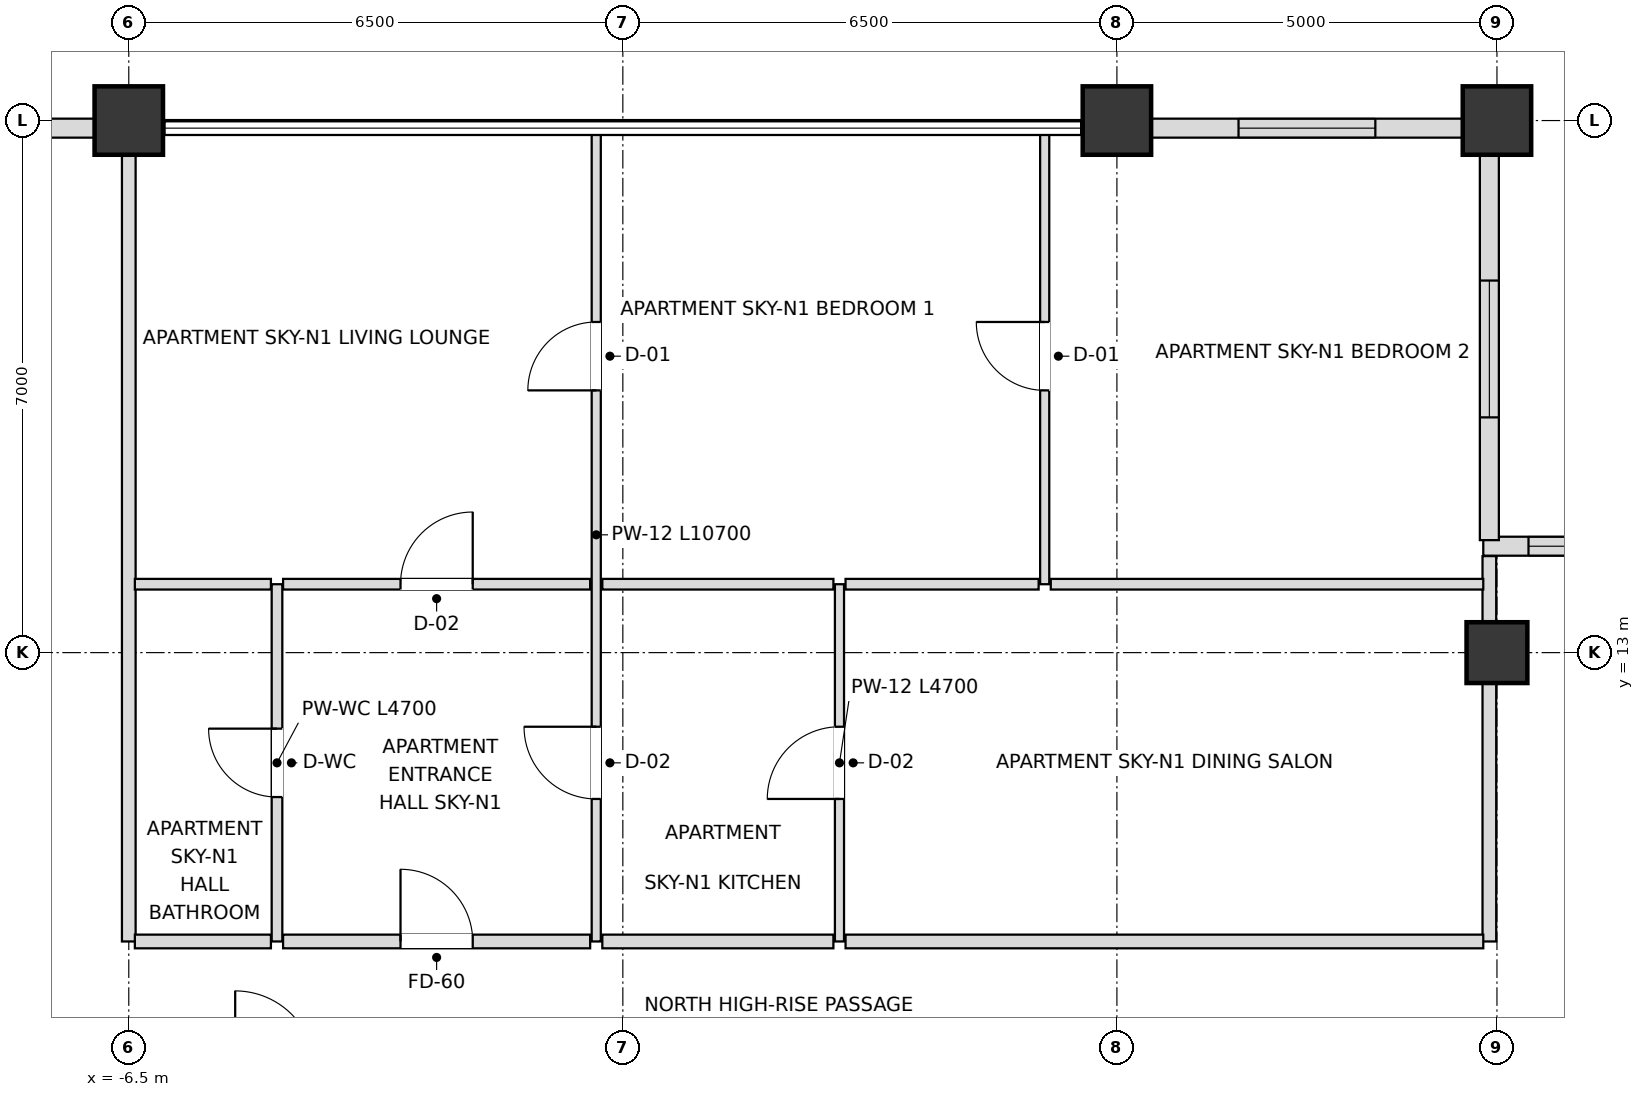
"""IFC4 building model, lengths in metres.
Left out: names, types, materials, properties, quantities, classifications, styles, units other than length and angle.
Written with IfcOpenShell. Run it as: python <this file> out.ifc"""

import sys

from ifc_helpers import new_model, si_unit, direction, frame, frame_2d, origin, origin_2d, place, context, subcontext, project, spatial, rectangle, extrude, element, fill, save


model = new_model("IFC4")
c1 = context("Model", 3, precision=1e-05, world=origin(), true_north=direction((0.0, 1.0)))
c2 = subcontext(c1, "Body", "Model", "MODEL_VIEW")
j1 = project(units=[si_unit("LENGTHUNIT", "METRE"), si_unit("PLANEANGLEUNIT", "RADIAN")], contexts=[c1])
p1 = place(None, origin())
s1 = spatial("IfcSite", under=j1, at=p1, CompositionType="ELEMENT")
p2 = place(p1, origin())
s2 = spatial("IfcBuilding", under=s1, at=p2, CompositionType="ELEMENT")
p3 = place(p2, frame((0.0, 0.0, 222.3)))
s3 = spatial("IfcBuildingStorey", under=s2, at=p3, CompositionType="ELEMENT", Elevation=222.3)
for number, where, z_axis, x_axis in (
    (1, (11.5, 20.0, 0.0), (0.0, 0.0, 1.0), (1.0, 0.0, 0.0)),
    (2, (6.5, 20.0, 0.0), (0.0, 0.0, 1.0), (1.0, 0.0, 0.0)),
    (3, (-6.5, 20.0, 0.0), (0.0, 0.0, 1.0), (1.0, 0.0, 0.0)),
):
    element("IfcColumn", number, at=place(p3, frame(where, z_axis=z_axis, x_axis=x_axis)), inside=s3, PredefinedType="USERDEFINED", context=c2, shape_type="SweptSolid", body=[
        extrude(rectangle(XDim=0.9, YDim=0.9, at=origin_2d()), origin(), (0.0, 0.0, 1.0), 3.6),
    ])
p4 = place(p3, frame((11.5, 13.0, 0.0), z_axis=(0.0, 0.0, 1.0), x_axis=(1.0, 0.0, 0.0)))
e4 = element("IfcColumn", 4, at=p4, inside=s3, PredefinedType="COLUMN", context=c2, shape_type="SweptSolid", body=[
    extrude(rectangle(XDim=0.8, YDim=0.8, at=origin_2d()), origin(), (0.0, 0.0, 1.0), 3.6),
])
p5 = place(p3, frame((11.055, 19.9, 0.0), z_axis=(0.0, 0.0, 1.0), x_axis=(-1.0, 0.0, 0.0)))
e5 = element("IfcWall", 5, at=p5, inside=s3, PredefinedType="SOLIDWALL", context=c2, shape_type="SweptSolid", body=[
    extrude(rectangle(XDim=4.11, YDim=0.25, at=frame_2d((2.055, 0.0))), origin(), (0.0, 0.0, 1.0), 2.748),
])
p6 = place(p5, frame((1.155, 0.0, 0.72)))
e6 = element("IfcOpeningElement", 6, at=p6, cuts=e5, PredefinedType="OPENING", context=c2, shape_type="SweptSolid", body=[
    extrude(rectangle(XDim=1.8, YDim=1.68, at=frame_2d((0.9, 0.84))), frame((0.0, 0.135, 0.0), z_axis=(0.0, -1.0, 0.0), x_axis=(1.0, 0.0, 0.0)), (0.0, 0.0, 1.0), 0.27),
])
p7 = place(p3, frame((-6.945, 19.9, 0.0), z_axis=(0.0, 0.0, 1.0), x_axis=(-1.0, 0.0, 0.0)))
e7 = element("IfcWall", 7, at=p7, inside=s3, PredefinedType="SOLIDWALL", context=c2, shape_type="SweptSolid", body=[
    extrude(rectangle(XDim=4.11, YDim=0.25, at=frame_2d((2.055, 0.0))), origin(), (0.0, 0.0, 1.0), 2.748),
])
p8 = place(p7, frame((1.155, 0.0, 0.72)))
e8 = element("IfcOpeningElement", 8, at=p8, cuts=e7, PredefinedType="OPENING", context=c2, shape_type="SweptSolid", body=[
    extrude(rectangle(XDim=1.8, YDim=1.68, at=frame_2d((0.9, 0.84))), frame((0.0, 0.135, 0.0), z_axis=(0.0, -1.0, 0.0), x_axis=(1.0, 0.0, 0.0)), (0.0, 0.0, 1.0), 0.27),
])
p9 = place(p3, frame((16.98, 14.4, 0.0), z_axis=(0.0, 0.0, 1.0), x_axis=(-1.0, 0.0, 0.0)))
e9 = element("IfcWall", 9, at=p9, inside=s3, PredefinedType="SOLIDWALL", context=c2, shape_type="SweptSolid", body=[
    extrude(rectangle(XDim=5.66, YDim=0.25, at=frame_2d((2.83, 0.0))), origin(), (0.0, 0.0, 1.0), 2.748),
])
p10 = place(p9, frame((0.595, 0.0, 0.72)))
e10 = element("IfcOpeningElement", 10, at=p10, cuts=e9, PredefinedType="OPENING", context=c2, shape_type="SweptSolid", body=[
    extrude(rectangle(XDim=1.8, YDim=1.68, at=frame_2d((0.9, 0.84))), frame((0.0, 0.135, 0.0), z_axis=(0.0, -1.0, 0.0), x_axis=(1.0, 0.0, 0.0)), (0.0, 0.0, 1.0), 0.27),
])
p11 = place(p9, frame((3.265, 0.0, 0.72)))
e11 = element("IfcOpeningElement", 11, at=p11, cuts=e9, PredefinedType="OPENING", context=c2, shape_type="SweptSolid", body=[
    extrude(rectangle(XDim=1.8, YDim=1.68, at=frame_2d((0.9, 0.84))), frame((0.0, 0.135, 0.0), z_axis=(0.0, -1.0, 0.0), x_axis=(1.0, 0.0, 0.0)), (0.0, 0.0, 1.0), 0.27),
])
p12 = place(p3, frame((11.4, 14.48, 0.0), z_axis=(0.0, 0.0, 1.0), x_axis=(0.0, 1.0, 0.0)))
e12 = element("IfcWall", 12, at=p12, inside=s3, PredefinedType="SOLIDWALL", context=c2, shape_type="SweptSolid", body=[
    extrude(rectangle(XDim=5.34, YDim=0.25, at=frame_2d((2.67, 0.0))), origin(), (0.0, 0.0, 1.0), 2.748),
])
p13 = place(p12, frame((1.615, 0.0, 0.72)))
e13 = element("IfcOpeningElement", 13, at=p13, cuts=e12, PredefinedType="OPENING", context=c2, shape_type="SweptSolid", body=[
    extrude(rectangle(XDim=1.8, YDim=1.68, at=frame_2d((0.9, 0.84))), frame((0.0, 0.135, 0.0), z_axis=(0.0, -1.0, 0.0), x_axis=(1.0, 0.0, 0.0)), (0.0, 0.0, 1.0), 0.27),
])
p14 = place(p3, frame((-6.5, 9.2, 0.0), z_axis=(0.0, 0.0, 1.0), x_axis=(0.0, 1.0, 0.0)))
e14 = element("IfcWall", 14, at=p14, inside=s3, PredefinedType="PARTITIONING", context=c2, shape_type="SweptSolid", body=[
    extrude(rectangle(XDim=10.7, YDim=0.18, at=frame_2d((5.35, 0.0))), origin(), (0.0, 0.0, 1.0), 2.826),
])
p15 = place(p3, frame((-4.55, 9.2, 0.0), z_axis=(0.0, 0.0, 1.0), x_axis=(0.0, 1.0, 0.0)))
e15 = element("IfcWall", 15, at=p15, inside=s3, PredefinedType="PARTITIONING", context=c2, shape_type="SweptSolid", body=[
    extrude(rectangle(XDim=4.7, YDim=0.14, at=frame_2d((2.35, 0.0))), origin(), (0.0, 0.0, 1.0), 3.38),
])
p16 = place(p15, frame((1.9, 0.0, 0.0)))
e16 = element("IfcOpeningElement", 16, at=p16, cuts=e15, PredefinedType="OPENING", context=c2, shape_type="SweptSolid", body=[
    extrude(rectangle(XDim=0.9, YDim=2.1, at=frame_2d((0.45, 1.05))), frame((0.0, 0.08, 0.0), z_axis=(0.0, -1.0, 0.0), x_axis=(1.0, 0.0, 0.0)), (0.0, 0.0, 1.0), 0.16),
])
p17 = place(p3, frame((-0.35, 9.2, 0.0), z_axis=(0.0, 0.0, 1.0), x_axis=(0.0, 1.0, 0.0)))
e17 = element("IfcWall", 17, at=p17, inside=s3, PredefinedType="PARTITIONING", context=c2, shape_type="SweptSolid", body=[
    extrude(rectangle(XDim=10.7, YDim=0.12, at=frame_2d((5.35, 0.0))), origin(), (0.0, 0.0, 1.0), 3.018),
])
p18 = place(p17, frame((1.875, 0.0, 0.0)))
e18 = element("IfcOpeningElement", 18, at=p18, cuts=e17, PredefinedType="OPENING", context=c2, shape_type="SweptSolid", body=[
    extrude(rectangle(XDim=0.95, YDim=2.1, at=frame_2d((0.475, 1.05))), frame((0.0, 0.07, 0.0), z_axis=(0.0, -1.0, 0.0), x_axis=(1.0, 0.0, 0.0)), (0.0, 0.0, 1.0), 0.14),
])
p19 = place(p17, frame((7.25, 0.0, 0.0)))
e19 = element("IfcOpeningElement", 19, at=p19, cuts=e17, PredefinedType="OPENING", context=c2, shape_type="SweptSolid", body=[
    extrude(rectangle(XDim=0.9, YDim=2.1, at=frame_2d((0.45, 1.05))), frame((0.0, 0.07, 0.0), z_axis=(0.0, -1.0, 0.0), x_axis=(1.0, 0.0, 0.0)), (0.0, 0.0, 1.0), 0.14),
])
p20 = place(p3, frame((2.85, 9.2, 0.0), z_axis=(0.0, 0.0, 1.0), x_axis=(0.0, 1.0, 0.0)))
e20 = element("IfcWall", 20, at=p20, inside=s3, PredefinedType="PARTITIONING", context=c2, shape_type="SweptSolid", body=[
    extrude(rectangle(XDim=4.7, YDim=0.12, at=frame_2d((2.35, 0.0))), origin(), (0.0, 0.0, 1.0), 3.38),
])
p21 = place(p20, frame((1.875, 0.0, 0.0)))
e21 = element("IfcOpeningElement", 21, at=p21, cuts=e20, PredefinedType="OPENING", context=c2, shape_type="SweptSolid", body=[
    extrude(rectangle(XDim=0.95, YDim=2.1, at=frame_2d((0.475, 1.05))), frame((0.0, 0.07, 0.0), z_axis=(0.0, -1.0, 0.0), x_axis=(1.0, 0.0, 0.0)), (0.0, 0.0, 1.0), 0.14),
])
p22 = place(p3, frame((5.55, 13.9, 0.0), z_axis=(0.0, 0.0, 1.0), x_axis=(0.0, 1.0, 0.0)))
e22 = element("IfcWall", 22, at=p22, inside=s3, PredefinedType="PARTITIONING", context=c2, shape_type="SweptSolid", body=[
    extrude(rectangle(XDim=6.0, YDim=0.12, at=frame_2d((3.0, 0.0))), origin(), (0.0, 0.0, 1.0), 3.018),
])
p23 = place(p22, frame((2.55, 0.0, 0.0)))
e23 = element("IfcOpeningElement", 23, at=p23, cuts=e22, PredefinedType="OPENING", context=c2, shape_type="SweptSolid", body=[
    extrude(rectangle(XDim=0.9, YDim=2.1, at=frame_2d((0.45, 1.05))), frame((0.0, 0.07, 0.0), z_axis=(0.0, -1.0, 0.0), x_axis=(1.0, 0.0, 0.0)), (0.0, 0.0, 1.0), 0.14),
])
p24 = place(p3, frame((11.4, 9.2, 0.0), z_axis=(0.0, 0.0, 1.0), x_axis=(0.0, 1.0, 0.0)))
e24 = element("IfcWall", 24, at=p24, inside=s3, PredefinedType="PARTITIONING", context=c2, shape_type="SweptSolid", body=[
    extrude(rectangle(XDim=5.07, YDim=0.18, at=frame_2d((2.535, 0.0))), origin(), (0.0, 0.0, 1.0), 2.748),
])
p25 = place(p3, frame((-6.42, 9.2, 0.0), z_axis=(0.0, 0.0, 1.0), x_axis=(1.0, 0.0, 0.0)))
e25 = element("IfcWall", 25, at=p25, inside=s3, PredefinedType="PARTITIONING", context=c2, shape_type="SweptSolid", body=[
    extrude(rectangle(XDim=1.79, YDim=0.18, at=frame_2d((0.895, 0.0))), origin(), (0.0, 0.0, 1.0), 3.38),
])
p26 = place(p3, frame((-4.47, 9.2, 0.0), z_axis=(0.0, 0.0, 1.0), x_axis=(1.0, 0.0, 0.0)))
e26 = element("IfcWall", 26, at=p26, inside=s3, PredefinedType="PARTITIONING", context=c2, shape_type="SweptSolid", body=[
    extrude(rectangle(XDim=4.04, YDim=0.18, at=frame_2d((2.02, 0.0))), origin(), (0.0, 0.0, 1.0), 3.38),
])
p27 = place(p26, frame((1.545, 0.0, 0.0)))
e27 = element("IfcOpeningElement", 27, at=p27, cuts=e26, PredefinedType="OPENING", context=c2, shape_type="SweptSolid", body=[
    extrude(rectangle(XDim=0.95, YDim=2.15, at=frame_2d((0.475, 1.075))), frame((0.0, 0.1, 0.0), z_axis=(0.0, -1.0, 0.0), x_axis=(1.0, 0.0, 0.0)), (0.0, 0.0, 1.0), 0.2),
])
p28 = place(p3, frame((-0.27, 9.2, 0.0), z_axis=(0.0, 0.0, 1.0), x_axis=(1.0, 0.0, 0.0)))
e28 = element("IfcWall", 28, at=p28, inside=s3, PredefinedType="PARTITIONING", context=c2, shape_type="SweptSolid", body=[
    extrude(rectangle(XDim=3.04, YDim=0.18, at=frame_2d((1.52, 0.0))), origin(), (0.0, 0.0, 1.0), 3.38),
])
p29 = place(p3, frame((2.93, 9.2, 0.0), z_axis=(0.0, 0.0, 1.0), x_axis=(1.0, 0.0, 0.0)))
e29 = element("IfcWall", 29, at=p29, inside=s3, PredefinedType="PARTITIONING", context=c2, shape_type="SweptSolid", body=[
    extrude(rectangle(XDim=8.39, YDim=0.18, at=frame_2d((4.195, 0.0))), origin(), (0.0, 0.0, 1.0), 2.826),
])
p30 = place(p3, frame((-6.42, 13.9, 0.0), z_axis=(0.0, 0.0, 1.0), x_axis=(1.0, 0.0, 0.0)))
e30 = element("IfcWall", 30, at=p30, inside=s3, PredefinedType="PARTITIONING", context=c2, shape_type="SweptSolid", body=[
    extrude(rectangle(XDim=1.79, YDim=0.14, at=frame_2d((0.895, 0.0))), origin(), (0.0, 0.0, 1.0), 3.38),
])
p31 = place(p3, frame((-4.47, 13.9, 0.0), z_axis=(0.0, 0.0, 1.0), x_axis=(1.0, 0.0, 0.0)))
e31 = element("IfcWall", 31, at=p31, inside=s3, PredefinedType="PARTITIONING", context=c2, shape_type="SweptSolid", body=[
    extrude(rectangle(XDim=4.04, YDim=0.14, at=frame_2d((2.02, 0.0))), origin(), (0.0, 0.0, 1.0), 3.38),
])
p32 = place(p31, frame((1.545, 0.0, 0.0)))
e32 = element("IfcOpeningElement", 32, at=p32, cuts=e31, PredefinedType="OPENING", context=c2, shape_type="SweptSolid", body=[
    extrude(rectangle(XDim=0.95, YDim=2.1, at=frame_2d((0.475, 1.05))), frame((0.0, 0.08, 0.0), z_axis=(0.0, -1.0, 0.0), x_axis=(1.0, 0.0, 0.0)), (0.0, 0.0, 1.0), 0.16),
])
p33 = place(p3, frame((-0.27, 13.9, 0.0), z_axis=(0.0, 0.0, 1.0), x_axis=(1.0, 0.0, 0.0)))
e33 = element("IfcWall", 33, at=p33, inside=s3, PredefinedType="PARTITIONING", context=c2, shape_type="SweptSolid", body=[
    extrude(rectangle(XDim=3.04, YDim=0.14, at=frame_2d((1.52, 0.0))), origin(), (0.0, 0.0, 1.0), 3.38),
])
p34 = place(p3, frame((2.93, 13.9, 0.0), z_axis=(0.0, 0.0, 1.0), x_axis=(1.0, 0.0, 0.0)))
e34 = element("IfcWall", 34, at=p34, inside=s3, PredefinedType="PARTITIONING", context=c2, shape_type="SweptSolid", body=[
    extrude(rectangle(XDim=2.54, YDim=0.14, at=frame_2d((1.27, 0.0))), origin(), (0.0, 0.0, 1.0), 3.38),
])
p35 = place(p3, frame((5.63, 13.9, 0.0), z_axis=(0.0, 0.0, 1.0), x_axis=(1.0, 0.0, 0.0)))
e35 = element("IfcWall", 35, at=p35, inside=s3, PredefinedType="PARTITIONING", context=c2, shape_type="SweptSolid", body=[
    extrude(rectangle(XDim=5.69, YDim=0.14, at=frame_2d((2.845, 0.0))), origin(), (0.0, 0.0, 1.0), 2.826),
])
p36 = place(p6, origin())
e36 = element("IfcWindow", 36, at=p36, inside=s3, PartitioningType="SINGLE_PANEL", PredefinedType="WINDOW", context=c2, shape_type="SweptSolid", body=[
    extrude(rectangle(XDim=1.8, YDim=1.68, at=frame_2d((0.9, 0.84))), frame((0.0, 0.03, 0.0), z_axis=(0.0, -1.0, 0.0), x_axis=(1.0, 0.0, 0.0)), (0.0, 0.0, 1.0), 0.06),
])
fill(e6, e36)
p37 = place(p11, origin())
e37 = element("IfcWindow", 37, at=p37, inside=s3, PartitioningType="SINGLE_PANEL", PredefinedType="WINDOW", context=c2, shape_type="SweptSolid", body=[
    extrude(rectangle(XDim=1.8, YDim=1.68, at=frame_2d((0.9, 0.84))), frame((0.0, 0.03, 0.0), z_axis=(0.0, -1.0, 0.0), x_axis=(1.0, 0.0, 0.0)), (0.0, 0.0, 1.0), 0.06),
])
fill(e11, e37)
p38 = place(p13, origin())
e38 = element("IfcWindow", 38, at=p38, inside=s3, PartitioningType="SINGLE_PANEL", PredefinedType="WINDOW", context=c2, shape_type="SweptSolid", body=[
    extrude(rectangle(XDim=1.8, YDim=1.68, at=frame_2d((0.9, 0.84))), frame((0.0, 0.03, 0.0), z_axis=(0.0, -1.0, 0.0), x_axis=(1.0, 0.0, 0.0)), (0.0, 0.0, 1.0), 0.06),
])
fill(e13, e38)
p39 = place(p16, origin())
e39 = element("IfcDoor", 39, at=p39, inside=s3, OperationType="SINGLE_SWING_RIGHT", PredefinedType="DOOR", context=c2, shape_type="SweptSolid", body=[
    extrude(rectangle(XDim=0.9, YDim=2.1, at=frame_2d((0.45, 1.05))), frame((0.0, 0.025, 0.0), z_axis=(0.0, -1.0, 0.0), x_axis=(1.0, 0.0, 0.0)), (0.0, 0.0, 1.0), 0.05),
])
fill(e16, e39)
p40 = place(p27, origin())
e40 = element("IfcDoor", 40, at=p40, inside=s3, OperationType="SINGLE_SWING_LEFT", PredefinedType="DOOR", context=c2, shape_type="SweptSolid", body=[
    extrude(rectangle(XDim=0.95, YDim=2.15, at=frame_2d((0.475, 1.075))), frame((0.0, 0.025, 0.0), z_axis=(0.0, -1.0, 0.0), x_axis=(1.0, 0.0, 0.0)), (0.0, 0.0, 1.0), 0.05),
])
fill(e27, e40)
p41 = place(p18, origin())
e41 = element("IfcDoor", 41, at=p41, inside=s3, OperationType="SINGLE_SWING_RIGHT", PredefinedType="DOOR", context=c2, shape_type="SweptSolid", body=[
    extrude(rectangle(XDim=0.95, YDim=2.1, at=frame_2d((0.475, 1.05))), frame((0.0, 0.025, 0.0), z_axis=(0.0, -1.0, 0.0), x_axis=(1.0, 0.0, 0.0)), (0.0, 0.0, 1.0), 0.05),
])
fill(e18, e41)
p42 = place(p21, origin())
e42 = element("IfcDoor", 42, at=p42, inside=s3, OperationType="SINGLE_SWING_LEFT", PredefinedType="DOOR", context=c2, shape_type="SweptSolid", body=[
    extrude(rectangle(XDim=0.95, YDim=2.1, at=frame_2d((0.475, 1.05))), frame((0.0, 0.025, 0.0), z_axis=(0.0, -1.0, 0.0), x_axis=(1.0, 0.0, 0.0)), (0.0, 0.0, 1.0), 0.05),
])
fill(e21, e42)
p43 = place(p32, origin())
e43 = element("IfcDoor", 43, at=p43, inside=s3, OperationType="SINGLE_SWING_RIGHT", PredefinedType="DOOR", context=c2, shape_type="SweptSolid", body=[
    extrude(rectangle(XDim=0.95, YDim=2.1, at=frame_2d((0.475, 1.05))), frame((0.0, 0.025, 0.0), z_axis=(0.0, -1.0, 0.0), x_axis=(1.0, 0.0, 0.0)), (0.0, 0.0, 1.0), 0.05),
])
fill(e32, e43)
p44 = place(p19, origin())
e44 = element("IfcDoor", 44, at=p44, inside=s3, OperationType="SINGLE_SWING_LEFT", PredefinedType="DOOR", context=c2, shape_type="SweptSolid", body=[
    extrude(rectangle(XDim=0.9, YDim=2.1, at=frame_2d((0.45, 1.05))), frame((0.0, 0.025, 0.0), z_axis=(0.0, -1.0, 0.0), x_axis=(1.0, 0.0, 0.0)), (0.0, 0.0, 1.0), 0.05),
])
fill(e19, e44)
p45 = place(p23, origin())
e45 = element("IfcDoor", 45, at=p45, inside=s3, OperationType="SINGLE_SWING_RIGHT", PredefinedType="DOOR", context=c2, shape_type="SweptSolid", body=[
    extrude(rectangle(XDim=0.9, YDim=2.1, at=frame_2d((0.45, 1.05))), frame((0.0, 0.025, 0.0), z_axis=(0.0, -1.0, 0.0), x_axis=(1.0, 0.0, 0.0)), (0.0, 0.0, 1.0), 0.05),
])
fill(e23, e45)
save(model, sys.argv[1])
